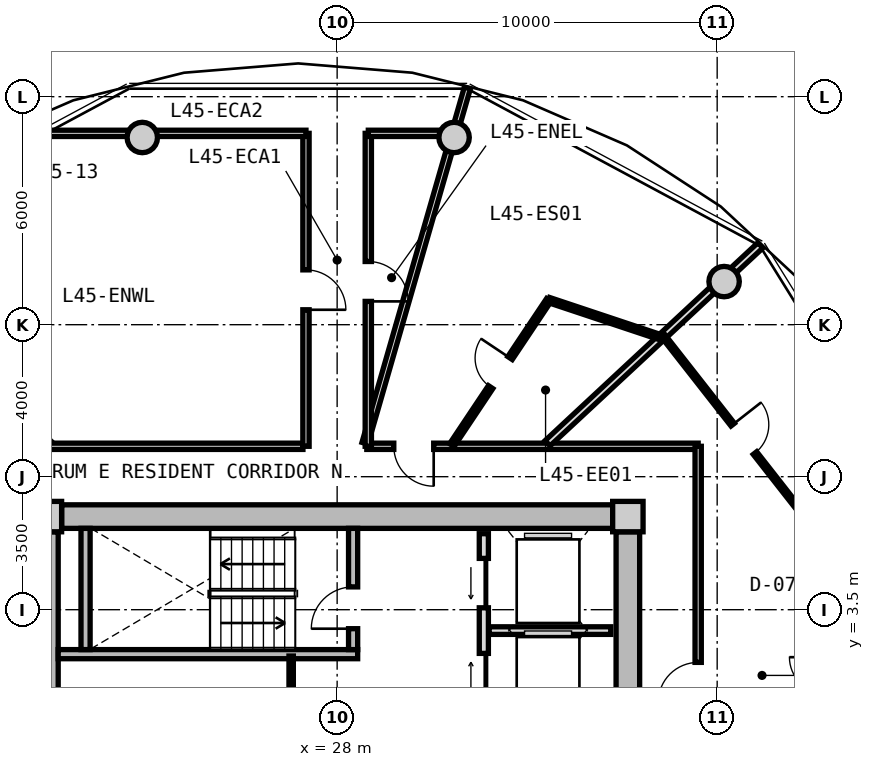
"""IFC4 building model, lengths in metres.
Left out: names, types, materials, properties, quantities, classifications, styles, units other than length and angle.
Written with IfcOpenShell. Run it as: python <this file> out.ifc"""

import sys

from ifc_helpers import new_model, si_unit, direction, frame, frame_2d, origin, origin_2d, place, context, subcontext, project, spatial, rectangle, circle, extrude, source, transform, mapped, element, fill, save


model = new_model("IFC4")
c1 = context("Model", 3, precision=1e-05, world=origin(), true_north=direction((0.0, 1.0)))
c2 = subcontext(c1, "Body", "Model", "MODEL_VIEW")
j1 = project(units=[si_unit("LENGTHUNIT", "METRE"), si_unit("PLANEANGLEUNIT", "RADIAN")], contexts=[c1])
p1 = place(None, origin())
s1 = spatial("IfcSite", under=j1, at=p1, CompositionType="ELEMENT")
p2 = place(p1, origin())
s2 = spatial("IfcBuilding", under=s1, at=p2, CompositionType="ELEMENT")
p3 = place(p2, frame((0.0, 0.0, 146.5)))
s3 = spatial("IfcBuildingStorey", under=s2, at=p3, CompositionType="ELEMENT", Elevation=146.5)
m1 = source(origin(), c2, "Body", "SweptSolid", [
    extrude(rectangle(XDim=0.8, YDim=0.8, at=origin_2d()), origin(), (0.0, 0.0, 1.0), 3.05),
])
for number, where, z_axis, x_axis in (
    (1, (35.65, 5.95, 0.0), (0.0, 0.0, 1.0), (1.0, 0.0, 0.0)),
    (2, (20.35, 5.95, 0.0), (0.0, 0.0, 1.0), (1.0, 0.0, 0.0)),
):
    element("IfcColumn", number, at=place(p3, frame(where, z_axis=z_axis, x_axis=x_axis)), inside=s3, PredefinedType="COLUMN", context=c2, shape_type="MappedRepresentation", body=[
        mapped(m1, transform((0.0, 0.0, 0.0), x_axis=(1.0, 0.0, 0.0), y_axis=(0.0, 1.0, 0.0), z_axis=(0.0, 0.0, 1.0), scale=1.0)),
    ])
m2 = source(origin(), c2, "Body", "SweptSolid", [
    extrude(rectangle(XDim=14.5, YDim=0.62, at=frame_2d((7.25, 0.0))), origin(), (0.0, 0.0, 1.0), 2.81),
])
p4 = place(p3, frame((20.75, 5.95, 0.0), z_axis=(0.0, 0.0, 1.0), x_axis=(1.0, 0.0, 0.0)))
e3 = element("IfcWall", 3, at=p4, inside=s3, PredefinedType="SHEAR", context=c2, shape_type="MappedRepresentation", body=[
    mapped(m2, transform((0.0, 0.0, 0.0), x_axis=(1.0, 0.0, 0.0), y_axis=(0.0, 1.0, 0.0), z_axis=(0.0, 0.0, 1.0), scale=1.0)),
])
m3 = source(origin(), c2, "Body", "SweptSolid", [
    extrude(rectangle(XDim=11.1, YDim=0.62, at=frame_2d((5.55, 0.0))), origin(), (0.0, 0.0, 1.0), 2.81),
])
p5 = place(p3, frame((20.35, -5.55, 0.0), z_axis=(0.0, 0.0, 1.0), x_axis=(0.0, 1.0, 0.0)))
e4 = element("IfcWall", 4, at=p5, inside=s3, PredefinedType="SHEAR", context=c2, shape_type="MappedRepresentation", body=[
    mapped(m3, transform((0.0, 0.0, 0.0), x_axis=(1.0, 0.0, 0.0), y_axis=(0.0, 1.0, 0.0), z_axis=(0.0, 0.0, 1.0), scale=1.0)),
])
p6 = place(p5, frame((3.8, 0.0, 0.0)))
e5 = element("IfcOpeningElement", 5, at=p6, cuts=e4, PredefinedType="OPENING", context=c2, shape_type="SweptSolid", body=[
    extrude(rectangle(XDim=1.2, YDim=2.15, at=frame_2d((0.6, 1.075))), frame((0.0, 0.32, 0.0), z_axis=(0.0, -1.0, 0.0), x_axis=(1.0, 0.0, 0.0)), (0.0, 0.0, 1.0), 0.64),
])
p7 = place(p3, frame((35.65, 5.55, 0.0), z_axis=(0.0, 0.0, 1.0), x_axis=(0.0, -1.0, 0.0)))
e6 = element("IfcWall", 6, at=p7, inside=s3, PredefinedType="SHEAR", context=c2, shape_type="MappedRepresentation", body=[
    mapped(m3, transform((0.0, 0.0, 0.0), x_axis=(1.0, 0.0, 0.0), y_axis=(0.0, 1.0, 0.0), z_axis=(0.0, 0.0, 1.0), scale=1.0)),
])
p8 = place(p7, frame((5.65, 0.0, 0.0)))
e7 = element("IfcOpeningElement", 7, at=p8, cuts=e6, PredefinedType="OPENING", context=c2, shape_type="SweptSolid", body=[
    extrude(rectangle(XDim=1.2, YDim=2.15, at=frame_2d((0.6, 1.075))), frame((0.0, 0.32, 0.0), z_axis=(0.0, -1.0, 0.0), x_axis=(1.0, 0.0, 0.0)), (0.0, 0.0, 1.0), 0.64),
])
m4 = source(origin(), c2, "Body", "SweptSolid", [
    extrude(circle(Radius=0.4, at=origin_2d()), origin(), (0.0, 0.0, 1.0), 3.05),
])
for number, where, z_axis, x_axis in (
    (8, (38.183, 12.135, 0.0), (0.0, 0.0, 1.0), (1.0, 0.0, 0.0)),
    (9, (31.077, 15.926, 0.0), (0.0, 0.0, 1.0), (1.0, 0.0, 0.0)),
    (10, (22.873, 15.926, 0.0), (0.0, 0.0, 1.0), (1.0, 0.0, 0.0)),
):
    element("IfcColumn", number, at=place(p3, frame(where, z_axis=z_axis, x_axis=x_axis)), inside=s3, PredefinedType="COLUMN", context=c2, shape_type="MappedRepresentation", body=[
        mapped(m4, transform((0.0, 0.0, 0.0), x_axis=(1.0, 0.0, 0.0), y_axis=(0.0, 1.0, 0.0), z_axis=(0.0, 0.0, 1.0), scale=1.0)),
    ])
m5 = source(origin(), c2, "Body", "SweptSolid", [
    extrude(rectangle(XDim=7.88, YDim=0.24, at=frame_2d((3.94, 0.0))), origin(), (0.0, 0.0, 1.0), 2.81),
])
p9 = place(p3, frame((20.66, 2.33, 0.0), z_axis=(0.0, 0.0, 1.0), x_axis=(1.0, 0.0, 0.0)))
e11 = element("IfcWall", 11, at=p9, inside=s3, PredefinedType="PARTITIONING", context=c2, shape_type="MappedRepresentation", body=[
    mapped(m5, transform((0.0, 0.0, 0.0), x_axis=(1.0, 0.0, 0.0), y_axis=(0.0, 1.0, 0.0), z_axis=(0.0, 0.0, 1.0), scale=1.0)),
])
m6 = source(origin(), c2, "Body", "SweptSolid", [
    extrude(rectangle(XDim=3.19, YDim=0.24, at=frame_2d((1.595, 0.0))), origin(), (0.0, 0.0, 1.0), 2.81),
])
p10 = place(p3, frame((21.38, 2.45, 0.0), z_axis=(0.0, 0.0, 1.0), x_axis=(0.0, 1.0, 0.0)))
e12 = element("IfcWall", 12, at=p10, inside=s3, PredefinedType="PARTITIONING", context=c2, shape_type="MappedRepresentation", body=[
    mapped(m6, transform((0.0, 0.0, 0.0), x_axis=(1.0, 0.0, 0.0), y_axis=(0.0, 1.0, 0.0), z_axis=(0.0, 0.0, 1.0), scale=1.0)),
])
p11 = place(p3, frame((28.42, 2.45, 0.0), z_axis=(0.0, 0.0, 1.0), x_axis=(0.0, 1.0, 0.0)))
e13 = element("IfcWall", 13, at=p11, inside=s3, PredefinedType="PARTITIONING", context=c2, shape_type="MappedRepresentation", body=[
    mapped(m6, transform((0.0, 0.0, 0.0), x_axis=(1.0, 0.0, 0.0), y_axis=(0.0, 1.0, 0.0), z_axis=(0.0, 0.0, 1.0), scale=1.0)),
])
p12 = place(p11, frame((0.55, 0.0, 0.0)))
e14 = element("IfcOpeningElement", 14, at=p12, cuts=e13, PredefinedType="OPENING", context=c2, shape_type="SweptSolid", body=[
    extrude(rectangle(XDim=1.1, YDim=2.15, at=frame_2d((0.55, 1.075))), frame((0.0, 0.13, 0.0), z_axis=(0.0, -1.0, 0.0), x_axis=(1.0, 0.0, 0.0)), (0.0, 0.0, 1.0), 0.26),
])
m7 = source(origin(), c2, "Body", "SweptSolid", [
    extrude(rectangle(XDim=5.0, YDim=0.24, at=frame_2d((2.5, 0.0))), origin(), (0.0, 0.0, 1.0), 2.795),
])
p13 = place(p3, frame((31.86, 0.5, 0.0), z_axis=(0.0, 0.0, 1.0), x_axis=(0.0, 1.0, 0.0)))
e15 = element("IfcWall", 15, at=p13, inside=s3, PredefinedType="PARTITIONING", context=c2, shape_type="MappedRepresentation", body=[
    mapped(m7, transform((0.0, 0.0, 0.0), x_axis=(1.0, 0.0, 0.0), y_axis=(0.0, 1.0, 0.0), z_axis=(0.0, 0.0, 1.0), scale=1.0)),
])
p14 = place(p13, frame((3.05, 0.0, 0.0)))
e16 = element("IfcOpeningElement", 16, at=p14, cuts=e15, PredefinedType="OPENING", context=c2, shape_type="SweptSolid", body=[
    extrude(rectangle(XDim=1.3, YDim=2.2, at=frame_2d((0.65, 1.1))), frame((0.0, 0.13, 0.0), z_axis=(0.0, -1.0, 0.0), x_axis=(1.0, 0.0, 0.0)), (0.0, 0.0, 1.0), 0.26),
])
p15 = place(p13, frame((0.55, 0.0, 0.0)))
e17 = element("IfcOpeningElement", 17, at=p15, cuts=e15, PredefinedType="OPENING", context=c2, shape_type="SweptSolid", body=[
    extrude(rectangle(XDim=1.3, YDim=2.2, at=frame_2d((0.65, 1.1))), frame((0.0, 0.13, 0.0), z_axis=(0.0, -1.0, 0.0), x_axis=(1.0, 0.0, 0.0)), (0.0, 0.0, 1.0), 0.26),
])
m8 = source(origin(), c2, "Body", "SweptSolid", [
    extrude(rectangle(XDim=3.2, YDim=0.2, at=frame_2d((1.6, 0.0))), origin(), (0.0, 0.0, 1.0), 2.795),
])
p16 = place(p3, frame((32.0, 2.95, 0.0), z_axis=(0.0, 0.0, 1.0), x_axis=(1.0, 0.0, 0.0)))
e18 = element("IfcWall", 18, at=p16, inside=s3, PredefinedType="PARTITIONING", context=c2, shape_type="MappedRepresentation", body=[
    mapped(m8, transform((0.0, 0.0, 0.0), x_axis=(1.0, 0.0, 0.0), y_axis=(0.0, 1.0, 0.0), z_axis=(0.0, 0.0, 1.0), scale=1.0)),
])
m9 = source(origin(), c2, "Body", "SweptSolid", [
    extrude(rectangle(XDim=2.33, YDim=0.115, at=frame_2d((1.165, 0.0))), origin(), (0.0, 0.0, 1.0), 2.795),
])
p17 = place(p3, frame((26.79, -0.05, 0.0), z_axis=(0.0, 0.0, 1.0), x_axis=(0.0, 1.0, 0.0)))
e19 = element("IfcWall", 19, at=p17, inside=s3, PredefinedType="PARTITIONING", context=c2, shape_type="MappedRepresentation", body=[
    mapped(m9, transform((0.0, 0.0, 0.0), x_axis=(1.0, 0.0, 0.0), y_axis=(0.0, 1.0, 0.0), z_axis=(0.0, 0.0, 1.0), scale=1.0)),
])
m10 = source(origin(), c2, "Body", "SweptSolid", [
    extrude(rectangle(XDim=8.6, YDim=0.165, at=frame_2d((4.3, 0.0))), origin(), (0.0, 0.0, 1.0), 2.795),
])
p18 = place(p3, frame((18.5, 7.8, 0.0), z_axis=(0.0, 0.0, 1.0), x_axis=(1.0, 0.0, 0.0)))
e20 = element("IfcWall", 20, at=p18, inside=s3, PredefinedType="PARTITIONING", context=c2, shape_type="MappedRepresentation", body=[
    mapped(m10, transform((0.0, 0.0, 0.0), x_axis=(1.0, 0.0, 0.0), y_axis=(0.0, 1.0, 0.0), z_axis=(0.0, 0.0, 1.0), scale=1.0)),
])
m11 = source(origin(), c2, "Body", "SweptSolid", [
    extrude(rectangle(XDim=8.719, YDim=0.165, at=frame_2d((4.36, 0.0))), origin(), (0.0, 0.0, 1.0), 2.795),
])
p19 = place(p3, frame((28.781, 7.8, 0.0), z_axis=(0.0, 0.0, 1.0), x_axis=(1.0, 0.0, 0.0)))
e21 = element("IfcWall", 21, at=p19, inside=s3, PredefinedType="PARTITIONING", context=c2, shape_type="MappedRepresentation", body=[
    mapped(m11, transform((0.0, 0.0, 0.0), x_axis=(1.0, 0.0, 0.0), y_axis=(0.0, 1.0, 0.0), z_axis=(0.0, 0.0, 1.0), scale=1.0)),
])
p20 = place(p19, frame((0.71, 0.0, 0.0)))
e22 = element("IfcOpeningElement", 22, at=p20, cuts=e21, PredefinedType="OPENING", context=c2, shape_type="SweptSolid", body=[
    extrude(rectangle(XDim=1.05, YDim=2.15, at=frame_2d((0.525, 1.075))), frame((0.0, 0.093, 0.0), z_axis=(0.0, -1.0, 0.0), x_axis=(1.0, 0.0, 0.0)), (0.0, 0.0, 1.0), 0.185),
])
m12 = source(origin(), c2, "Body", "SweptSolid", [
    extrude(rectangle(XDim=15.6, YDim=0.165, at=frame_2d((7.8, 0.0))), origin(), (0.0, 0.0, 1.0), 2.795),
])
p21 = place(p3, frame((37.5, 7.8, 0.0), z_axis=(0.0, 0.0, 1.0), x_axis=(0.0, -1.0, 0.0)))
e23 = element("IfcWall", 23, at=p21, inside=s3, PredefinedType="PARTITIONING", context=c2, shape_type="MappedRepresentation", body=[
    mapped(m12, transform((0.0, 0.0, 0.0), x_axis=(1.0, 0.0, 0.0), y_axis=(0.0, 1.0, 0.0), z_axis=(0.0, 0.0, 1.0), scale=1.0)),
])
p22 = place(p21, frame((5.687, 0.0, 0.0)))
e24 = element("IfcOpeningElement", 24, at=p22, cuts=e23, PredefinedType="OPENING", context=c2, shape_type="SweptSolid", body=[
    extrude(rectangle(XDim=1.05, YDim=2.15, at=frame_2d((0.525, 1.075))), frame((0.0, 0.093, 0.0), z_axis=(0.0, -1.0, 0.0), x_axis=(1.0, 0.0, 0.0)), (0.0, 0.0, 1.0), 0.185),
])
m13 = source(origin(), c2, "Body", "SweptSolid", [
    extrude(rectangle(XDim=9.73, YDim=0.165, at=frame_2d((4.865, 0.0))), origin(), (0.0, 0.0, 1.0), 2.345),
])
p23 = place(p3, frame((28.733, 7.88, 0.0), z_axis=(0.0, 0.0, 1.0), x_axis=(0.27679492614, 0.960929013436, 0.0)))
e25 = element("IfcWall", 25, at=p23, inside=s3, PredefinedType="PARTITIONING", context=c2, shape_type="MappedRepresentation", body=[
    mapped(m13, transform((0.0, 0.0, 0.0), x_axis=(1.0, 0.0, 0.0), y_axis=(0.0, 1.0, 0.0), z_axis=(0.0, 0.0, 1.0), scale=1.0)),
])
m14 = source(origin(), c2, "Body", "SweptSolid", [
    extrude(rectangle(XDim=8.235, YDim=0.165, at=frame_2d((4.118, 0.0))), origin(), (0.0, 0.0, 1.0), 2.795),
])
p24 = place(p3, frame((27.18, 7.8, 0.0), z_axis=(0.0, 0.0, 1.0), x_axis=(0.0, 1.0, 0.0)))
e26 = element("IfcWall", 26, at=p24, inside=s3, PredefinedType="PARTITIONING", context=c2, shape_type="MappedRepresentation", body=[
    mapped(m14, transform((0.0, 0.0, 0.0), x_axis=(1.0, 0.0, 0.0), y_axis=(0.0, 1.0, 0.0), z_axis=(0.0, 0.0, 1.0), scale=1.0)),
])
p25 = place(p24, frame((3.593, 0.0, 0.0)))
e27 = element("IfcOpeningElement", 27, at=p25, cuts=e26, PredefinedType="OPENING", context=c2, shape_type="SweptSolid", body=[
    extrude(rectangle(XDim=1.05, YDim=2.15, at=frame_2d((0.525, 1.075))), frame((0.0, 0.093, 0.0), z_axis=(0.0, -1.0, 0.0), x_axis=(1.0, 0.0, 0.0)), (0.0, 0.0, 1.0), 0.185),
])
m15 = source(origin(), c2, "Body", "SweptSolid", [
    extrude(rectangle(XDim=7.139, YDim=0.165, at=frame_2d((3.569, 0.0))), origin(), (0.0, 0.0, 1.0), 2.345),
])
p26 = place(p3, frame((20.041, 16.035, 0.0), z_axis=(0.0, 0.0, 1.0), x_axis=(1.0, 0.0, 0.0)))
e28 = element("IfcWall", 28, at=p26, inside=s3, PredefinedType="PARTITIONING", context=c2, shape_type="MappedRepresentation", body=[
    mapped(m15, transform((0.0, 0.0, 0.0), x_axis=(1.0, 0.0, 0.0), y_axis=(0.0, 1.0, 0.0), z_axis=(0.0, 0.0, 1.0), scale=1.0)),
])
p27 = place(p3, frame((28.82, 7.8, 0.0), z_axis=(0.0, 0.0, 1.0), x_axis=(0.0, 1.0, 0.0)))
e29 = element("IfcWall", 29, at=p27, inside=s3, PredefinedType="PARTITIONING", context=c2, shape_type="MappedRepresentation", body=[
    mapped(m14, transform((0.0, 0.0, 0.0), x_axis=(1.0, 0.0, 0.0), y_axis=(0.0, 1.0, 0.0), z_axis=(0.0, 0.0, 1.0), scale=1.0)),
])
p28 = place(p27, frame((3.813, 0.0, 0.0)))
e30 = element("IfcOpeningElement", 30, at=p28, cuts=e29, PredefinedType="OPENING", context=c2, shape_type="SweptSolid", body=[
    extrude(rectangle(XDim=1.05, YDim=2.15, at=frame_2d((0.525, 1.075))), frame((0.0, 0.093, 0.0), z_axis=(0.0, -1.0, 0.0), x_axis=(1.0, 0.0, 0.0)), (0.0, 0.0, 1.0), 0.185),
])
m16 = source(origin(), c2, "Body", "SweptSolid", [
    extrude(rectangle(XDim=2.419, YDim=0.165, at=frame_2d((1.209, 0.0))), origin(), (0.0, 0.0, 1.0), 2.345),
])
p29 = place(p3, frame((28.82, 16.035, 0.0), z_axis=(0.0, 0.0, 1.0), x_axis=(1.0, 0.0, 0.0)))
e31 = element("IfcWall", 31, at=p29, inside=s3, PredefinedType="PARTITIONING", context=c2, shape_type="MappedRepresentation", body=[
    mapped(m16, transform((0.0, 0.0, 0.0), x_axis=(1.0, 0.0, 0.0), y_axis=(0.0, 1.0, 0.0), z_axis=(0.0, 0.0, 1.0), scale=1.0)),
])
m17 = source(origin(), c2, "Body", "SweptSolid", [
    extrude(rectangle(XDim=7.648, YDim=0.19, at=frame_2d((3.824, 0.0))), origin(), (0.0, 0.0, 1.0), 2.345),
])
p30 = place(p3, frame((33.538, 7.88, 0.0), z_axis=(0.0, 0.0, 1.0), x_axis=(0.732167856666, 0.681124239522, 0.0)))
e32 = element("IfcWall", 32, at=p30, inside=s3, PredefinedType="PARTITIONING", context=c2, shape_type="MappedRepresentation", body=[
    mapped(m17, transform((0.0, 0.0, 0.0), x_axis=(1.0, 0.0, 0.0), y_axis=(0.0, 1.0, 0.0), z_axis=(0.0, 0.0, 1.0), scale=1.0)),
])
m18 = source(origin(), c2, "Body", "SweptSolid", [
    extrude(rectangle(XDim=6.966, YDim=0.115, at=frame_2d((3.483, 0.0))), origin(), (0.0, 0.0, 1.0), 2.795),
])
p31 = place(p3, frame((40.85, 5.254, 0.0), z_axis=(0.0, 0.0, 1.0), x_axis=(-0.616695640563, 0.787201681217, 0.0)))
e33 = element("IfcWall", 33, at=p31, inside=s3, PredefinedType="PARTITIONING", context=c2, shape_type="MappedRepresentation", body=[
    mapped(m18, transform((0.0, 0.0, 0.0), x_axis=(1.0, 0.0, 0.0), y_axis=(0.0, 1.0, 0.0), z_axis=(0.0, 0.0, 1.0), scale=1.0)),
])
p32 = place(p31, frame((3.008, 0.0, 0.0)))
e34 = element("IfcOpeningElement", 34, at=p32, cuts=e33, PredefinedType="OPENING", context=c2, shape_type="SweptSolid", body=[
    extrude(rectangle(XDim=0.95, YDim=2.1, at=frame_2d((0.475, 1.05))), frame((0.0, 0.067, 0.0), z_axis=(0.0, -1.0, 0.0), x_axis=(1.0, 0.0, 0.0)), (0.0, 0.0, 1.0), 0.135),
])
m19 = source(origin(), c2, "Body", "SweptSolid", [
    extrude(rectangle(XDim=4.593, YDim=0.14, at=frame_2d((2.296, 0.0))), origin(), (0.0, 0.0, 1.0), 2.795),
])
p33 = place(p3, frame((31.019, 7.83, 0.0), z_axis=(0.0, 0.0, 1.0), x_axis=(0.555362412301, 0.831608436107, 0.0)))
e35 = element("IfcWall", 35, at=p33, inside=s3, PredefinedType="PARTITIONING", context=c2, shape_type="MappedRepresentation", body=[
    mapped(m19, transform((0.0, 0.0, 0.0), x_axis=(1.0, 0.0, 0.0), y_axis=(0.0, 1.0, 0.0), z_axis=(0.0, 0.0, 1.0), scale=1.0)),
])
p34 = place(p33, frame((1.836, 0.0, 0.0)))
e36 = element("IfcOpeningElement", 36, at=p34, cuts=e35, PredefinedType="OPENING", context=c2, shape_type="SweptSolid", body=[
    extrude(rectangle(XDim=0.92, YDim=2.1, at=frame_2d((0.46, 1.05))), frame((0.0, 0.08, 0.0), z_axis=(0.0, -1.0, 0.0), x_axis=(1.0, 0.0, 0.0)), (0.0, 0.0, 1.0), 0.16),
])
m20 = source(origin(), c2, "Body", "SweptSolid", [
    extrude(rectangle(XDim=3.077, YDim=0.14, at=frame_2d((1.538, 0.0))), origin(), (0.0, 0.0, 1.0), 2.795),
])
p35 = place(p3, frame((33.57, 11.65, 0.0), z_axis=(0.0, 0.0, 1.0), x_axis=(0.948635676976, -0.3163705934, 0.0)))
e37 = element("IfcWall", 37, at=p35, inside=s3, PredefinedType="PARTITIONING", context=c2, shape_type="MappedRepresentation", body=[
    mapped(m20, transform((0.0, 0.0, 0.0), x_axis=(1.0, 0.0, 0.0), y_axis=(0.0, 1.0, 0.0), z_axis=(0.0, 0.0, 1.0), scale=1.0)),
])
m21 = source(origin(), c2, "Body", "SweptSolid", [
    extrude(rectangle(XDim=1.1, YDim=2.15, at=frame_2d((0.55, 1.075))), frame((0.0, 0.025, 0.0), z_axis=(0.0, -1.0, 0.0), x_axis=(1.0, 0.0, 0.0)), (0.0, 0.0, 1.0), 0.05),
])
p36 = place(p12, origin())
e38 = element("IfcDoor", 38, at=p36, inside=s3, OperationType="SINGLE_SWING_LEFT", PredefinedType="DOOR", context=c2, shape_type="MappedRepresentation", body=[
    mapped(m21, transform((0.0, 0.0, 0.0), x_axis=(1.0, 0.0, 0.0), y_axis=(0.0, 1.0, 0.0), z_axis=(0.0, 0.0, 1.0), scale=1.0)),
])
fill(e14, e38)
m22 = source(origin(), c2, "Body", "SweptSolid", [
    extrude(rectangle(XDim=1.3, YDim=2.2, at=frame_2d((0.65, 1.1))), frame((0.0, 0.025, 0.0), z_axis=(0.0, -1.0, 0.0), x_axis=(1.0, 0.0, 0.0)), (0.0, 0.0, 1.0), 0.05),
])
p37 = place(p14, origin())
e39 = element("IfcDoor", 39, at=p37, inside=s3, OperationType="SLIDING_TO_LEFT", PredefinedType="DOOR", context=c2, shape_type="MappedRepresentation", body=[
    mapped(m22, transform((0.0, 0.0, 0.0), x_axis=(1.0, 0.0, 0.0), y_axis=(0.0, 1.0, 0.0), z_axis=(0.0, 0.0, 1.0), scale=1.0)),
])
fill(e16, e39)
p38 = place(p15, origin())
e40 = element("IfcDoor", 40, at=p38, inside=s3, OperationType="SLIDING_TO_RIGHT", PredefinedType="DOOR", context=c2, shape_type="MappedRepresentation", body=[
    mapped(m22, transform((0.0, 0.0, 0.0), x_axis=(1.0, 0.0, 0.0), y_axis=(0.0, 1.0, 0.0), z_axis=(0.0, 0.0, 1.0), scale=1.0)),
])
fill(e17, e40)
m23 = source(origin(), c2, "Body", "SweptSolid", [
    extrude(rectangle(XDim=1.05, YDim=2.15, at=frame_2d((0.525, 1.075))), frame((0.0, 0.025, 0.0), z_axis=(0.0, -1.0, 0.0), x_axis=(1.0, 0.0, 0.0)), (0.0, 0.0, 1.0), 0.05),
])
p39 = place(p25, frame((1.05, 0.0, 0.0), z_axis=(0.0, 0.0, 1.0), x_axis=(-1.0, 0.0, 0.0)))
e41 = element("IfcDoor", 41, at=p39, inside=s3, OperationType="SINGLE_SWING_RIGHT", PredefinedType="DOOR", context=c2, shape_type="MappedRepresentation", body=[
    mapped(m23, transform((0.0, 0.0, 0.0), x_axis=(1.0, 0.0, 0.0), y_axis=(0.0, 1.0, 0.0), z_axis=(0.0, 0.0, 1.0), scale=1.0)),
])
fill(e27, e41)
p40 = place(p28, frame((1.05, 0.0, 0.0), z_axis=(0.0, 0.0, 1.0), x_axis=(-1.0, 0.0, 0.0)))
e42 = element("IfcDoor", 42, at=p40, inside=s3, OperationType="SINGLE_SWING_RIGHT", PredefinedType="DOOR", context=c2, shape_type="MappedRepresentation", body=[
    mapped(m23, transform((0.0, 0.0, 0.0), x_axis=(1.0, 0.0, 0.0), y_axis=(0.0, 1.0, 0.0), z_axis=(0.0, 0.0, 1.0), scale=1.0)),
])
fill(e30, e42)
p41 = place(p22, frame((1.05, 0.0, 0.0), z_axis=(0.0, 0.0, 1.0), x_axis=(-1.0, 0.0, 0.0)))
e43 = element("IfcDoor", 43, at=p41, inside=s3, OperationType="SINGLE_SWING_LEFT", PredefinedType="DOOR", context=c2, shape_type="MappedRepresentation", body=[
    mapped(m23, transform((0.0, 0.0, 0.0), x_axis=(1.0, 0.0, 0.0), y_axis=(0.0, 1.0, 0.0), z_axis=(0.0, 0.0, 1.0), scale=1.0)),
])
fill(e24, e43)
m24 = source(origin(), c2, "Body", "SweptSolid", [
    extrude(rectangle(XDim=0.95, YDim=2.1, at=frame_2d((0.475, 1.05))), frame((0.0, 0.025, 0.0), z_axis=(0.0, -1.0, 0.0), x_axis=(1.0, 0.0, 0.0)), (0.0, 0.0, 1.0), 0.05),
])
p42 = place(p32, frame((0.95, 0.0, 0.0), z_axis=(0.0, 0.0, 1.0), x_axis=(-1.0, 0.0, 0.0)))
e44 = element("IfcDoor", 44, at=p42, inside=s3, OperationType="SINGLE_SWING_LEFT", PredefinedType="DOOR", context=c2, shape_type="MappedRepresentation", body=[
    mapped(m24, transform((0.0, 0.0, 0.0), x_axis=(1.0, 0.0, 0.0), y_axis=(0.0, 1.0, 0.0), z_axis=(0.0, 0.0, 1.0), scale=1.0)),
])
fill(e34, e44)
p43 = place(p20, frame((1.05, 0.0, 0.0), z_axis=(0.0, 0.0, 1.0), x_axis=(-1.0, 0.0, 0.0)))
e45 = element("IfcDoor", 45, at=p43, inside=s3, OperationType="SINGLE_SWING_LEFT", PredefinedType="DOOR", context=c2, shape_type="MappedRepresentation", body=[
    mapped(m23, transform((0.0, 0.0, 0.0), x_axis=(1.0, 0.0, 0.0), y_axis=(0.0, 1.0, 0.0), z_axis=(0.0, 0.0, 1.0), scale=1.0)),
])
fill(e22, e45)
m25 = source(origin(), c2, "Body", "SweptSolid", [
    extrude(rectangle(XDim=0.92, YDim=2.1, at=frame_2d((0.46, 1.05))), frame((0.0, 0.025, 0.0), z_axis=(0.0, -1.0, 0.0), x_axis=(1.0, 0.0, 0.0)), (0.0, 0.0, 1.0), 0.05),
])
p44 = place(p34, origin())
e46 = element("IfcDoor", 46, at=p44, inside=s3, OperationType="SINGLE_SWING_RIGHT", PredefinedType="DOOR", context=c2, shape_type="MappedRepresentation", body=[
    mapped(m25, transform((0.0, 0.0, 0.0), x_axis=(1.0, 0.0, 0.0), y_axis=(0.0, 1.0, 0.0), z_axis=(0.0, 0.0, 1.0), scale=1.0)),
])
fill(e36, e46)
save(model, sys.argv[1])
